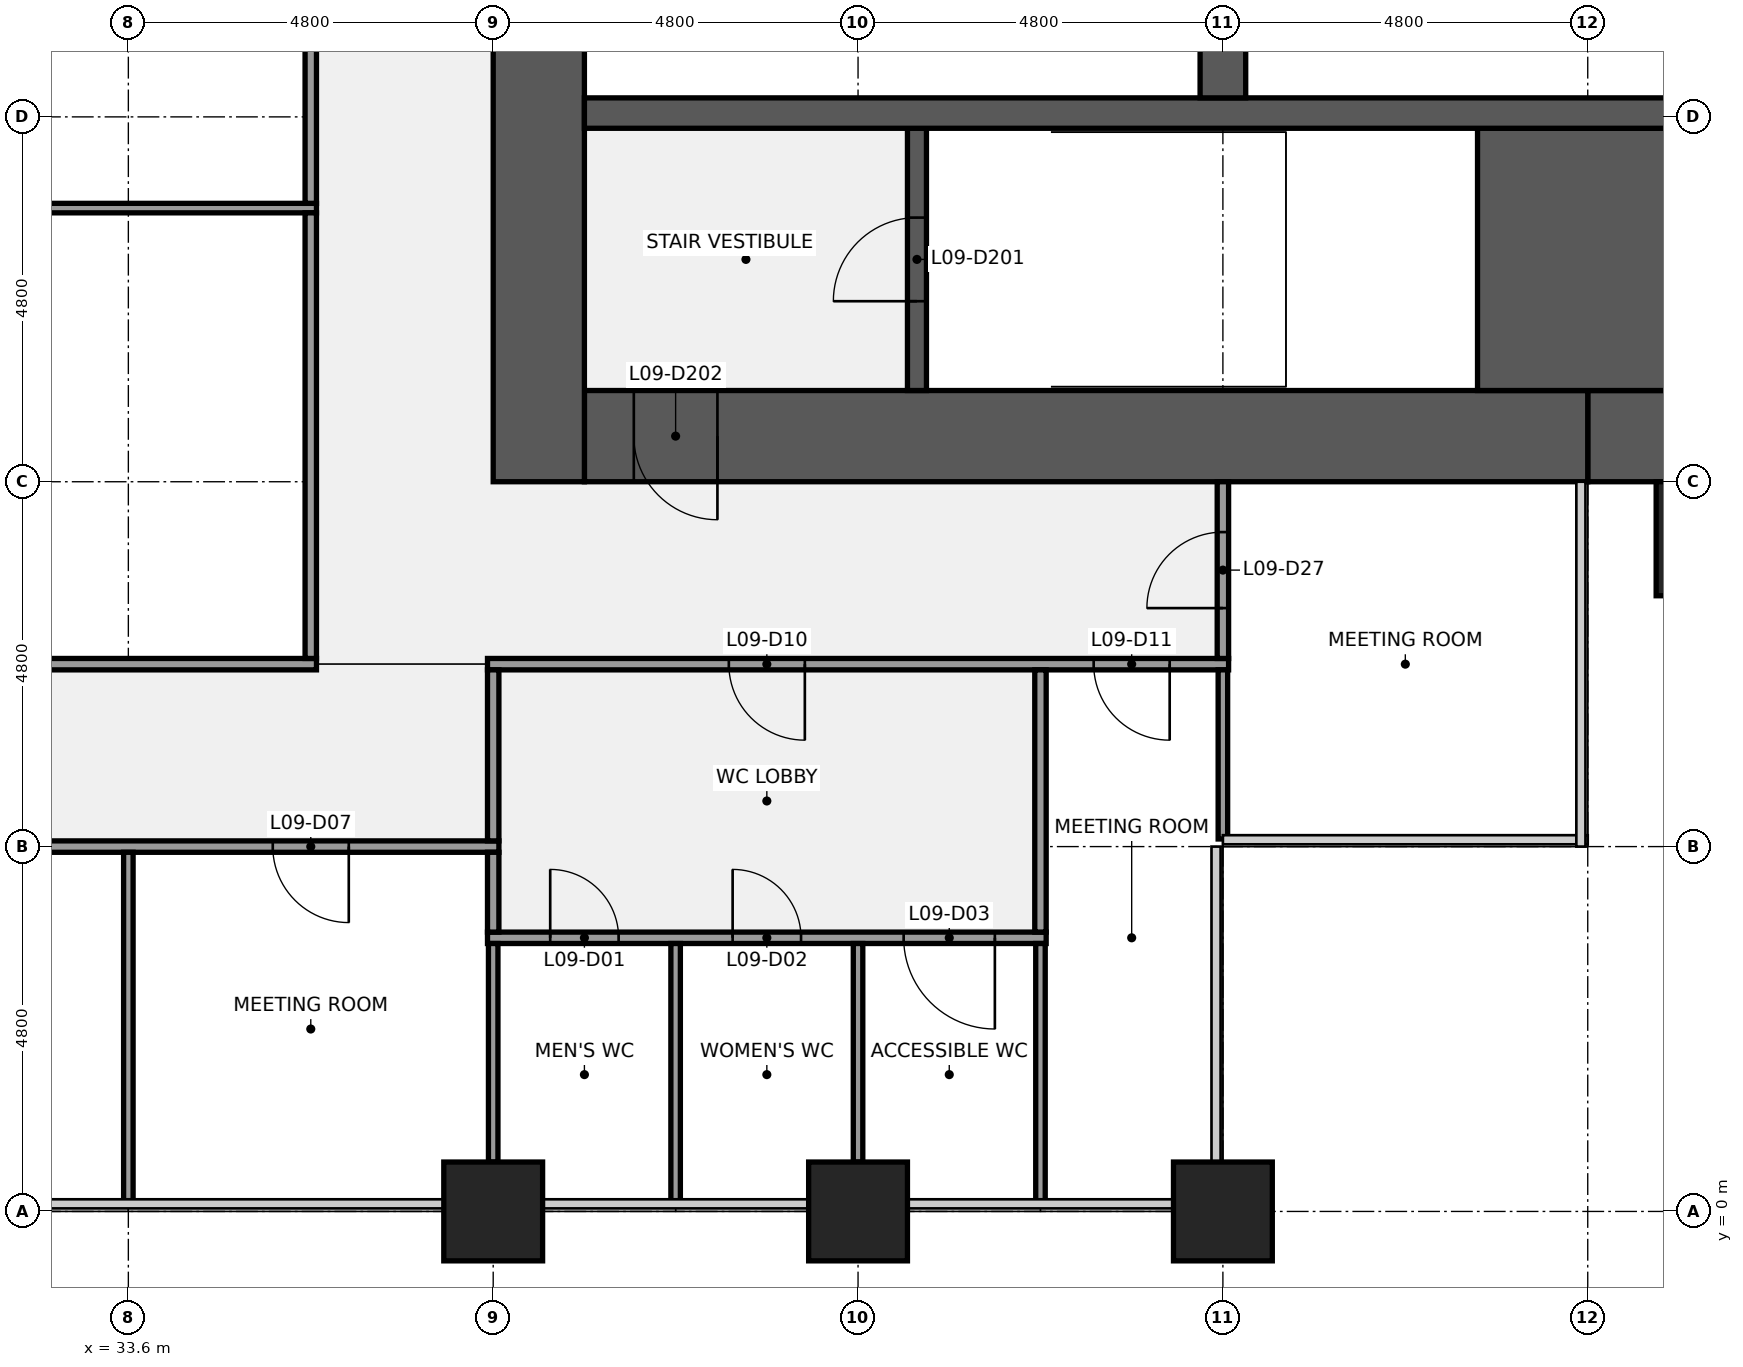
"""IFC4 building model, lengths in metres.
Left out: names, types, materials, properties, quantities, classifications, styles, units other than length and angle.
Written with IfcOpenShell. Run it as: python <this file> out.ifc"""

import sys

from ifc_helpers import new_model, si_unit, direction, frame, frame_2d, origin, origin_2d, place, context, subcontext, project, spatial, rectangle, extrude, element, fill, save


model = new_model("IFC4")
c1 = context("Model", 3, precision=1e-05, world=origin(), true_north=direction((0.0, 1.0)))
c2 = subcontext(c1, "Body", "Model", "MODEL_VIEW")
j1 = project(units=[si_unit("LENGTHUNIT", "METRE"), si_unit("PLANEANGLEUNIT", "RADIAN")], contexts=[c1])
p1 = place(None, origin())
s1 = spatial("IfcSite", under=j1, at=p1, CompositionType="ELEMENT")
p2 = place(p1, origin())
s2 = spatial("IfcBuilding", under=s1, at=p2, CompositionType="ELEMENT")
p3 = place(p2, frame((0.0, 0.0, 47.0)))
s3 = spatial("IfcBuildingStorey", under=s2, at=p3, CompositionType="ELEMENT", Elevation=47.0)
for number, where, z_axis, x_axis in (
    (1, (38.4, 0.0, 0.0), (0.0, 0.0, 1.0), (1.0, 0.0, 0.0)),
    (2, (43.2, 0.0, 0.0), (0.0, 0.0, 1.0), (1.0, 0.0, 0.0)),
    (3, (48.0, 0.0, 0.0), (0.0, 0.0, 1.0), (1.0, 0.0, 0.0)),
):
    element("IfcColumn", number, at=place(p3, frame(where, z_axis=z_axis, x_axis=x_axis)), inside=s3, PredefinedType="COLUMN", context=c2, shape_type="SweptSolid", body=[
        extrude(rectangle(XDim=1.3, YDim=1.3, at=origin_2d()), origin(), (0.0, 0.0, 1.0), 4.0),
    ])
p4 = place(p3, frame((56.4, 10.2, 0.0), z_axis=(0.0, 0.0, 1.0), x_axis=(-1.0, 0.0, 0.0)))
e4 = element("IfcWall", 4, at=p4, inside=s3, PredefinedType="SHEAR", context=c2, shape_type="SweptSolid", body=[
    extrude(rectangle(XDim=3.6, YDim=1.2, at=frame_2d((1.8, 0.0))), origin(), (0.0, 0.0, 1.0), 3.84),
])
p5 = place(p3, frame((52.8, 10.2, 0.0), z_axis=(0.0, 0.0, 1.0), x_axis=(-1.0, 0.0, 0.0)))
e5 = element("IfcWall", 5, at=p5, inside=s3, PredefinedType="SHEAR", context=c2, shape_type="SweptSolid", body=[
    extrude(rectangle(XDim=13.2, YDim=1.2, at=frame_2d((6.6, 0.0))), origin(), (0.0, 0.0, 1.0), 3.84),
])
p6 = place(p5, frame((11.45, 0.0, 0.0)))
e6 = element("IfcOpeningElement", 6, at=p6, cuts=e5, PredefinedType="OPENING", context=c2, shape_type="SweptSolid", body=[
    extrude(rectangle(XDim=1.1, YDim=2.1, at=frame_2d((0.55, 1.05))), frame((0.0, 0.61, 0.0), z_axis=(0.0, -1.0, 0.0), x_axis=(1.0, 0.0, 0.0)), (0.0, 0.0, 1.0), 1.22),
])
p7 = place(p3, frame((39.0, 9.6, 0.0), z_axis=(0.0, 0.0, 1.0), x_axis=(0.0, 1.0, 0.0)))
e7 = element("IfcWall", 7, at=p7, inside=s3, PredefinedType="SHEAR", context=c2, shape_type="SweptSolid", body=[
    extrude(rectangle(XDim=28.8, YDim=1.2, at=frame_2d((14.4, 0.0))), origin(), (0.0, 0.0, 1.0), 3.84),
])
p8 = place(p7, frame((8.7, 0.0, 0.0)))
e8 = element("IfcOpeningElement", 8, at=p8, cuts=e7, PredefinedType="OPENING", context=c2, shape_type="SweptSolid", body=[
    extrude(rectangle(XDim=1.8, YDim=2.1, at=frame_2d((0.9, 1.05))), frame((0.0, 0.61, 0.0), z_axis=(0.0, -1.0, 0.0), x_axis=(1.0, 0.0, 0.0)), (0.0, 0.0, 1.0), 1.22),
])
p9 = place(p7, frame((18.3, 0.0, 0.0)))
e9 = element("IfcOpeningElement", 9, at=p9, cuts=e7, PredefinedType="OPENING", context=c2, shape_type="SweptSolid", body=[
    extrude(rectangle(XDim=1.8, YDim=2.1, at=frame_2d((0.9, 1.05))), frame((0.0, 0.61, 0.0), z_axis=(0.0, -1.0, 0.0), x_axis=(1.0, 0.0, 0.0)), (0.0, 0.0, 1.0), 1.22),
])
p10 = place(p3, frame((51.35, 12.525, 0.0), z_axis=(0.0, 0.0, 1.0), x_axis=(1.0, 0.0, 0.0)))
e10 = element("IfcWall", 10, at=p10, inside=s3, PredefinedType="SHEAR", context=c2, shape_type="SweptSolid", body=[
    extrude(rectangle(XDim=5.05, YDim=3.45, at=frame_2d((2.525, 0.0))), origin(), (0.0, 0.0, 1.0), 3.84),
])
p11 = place(p3, frame((43.975, 10.8, 0.0), z_axis=(0.0, 0.0, 1.0), x_axis=(0.0, 1.0, 0.0)))
e11 = element("IfcWall", 11, at=p11, inside=s3, PredefinedType="SHEAR", context=c2, shape_type="SweptSolid", body=[
    extrude(rectangle(XDim=3.45, YDim=0.25, at=frame_2d((1.725, 0.0))), origin(), (0.0, 0.0, 1.0), 3.84),
])
p12 = place(p11, frame((1.175, 0.0, 0.0)))
e12 = element("IfcOpeningElement", 12, at=p12, cuts=e11, PredefinedType="OPENING", context=c2, shape_type="SweptSolid", body=[
    extrude(rectangle(XDim=1.1, YDim=2.1, at=frame_2d((0.55, 1.05))), frame((0.0, 0.135, 0.0), z_axis=(0.0, -1.0, 0.0), x_axis=(1.0, 0.0, 0.0)), (0.0, 0.0, 1.0), 0.27),
])
p13 = place(p3, frame((39.6, 14.45, 0.0), z_axis=(0.0, 0.0, 1.0), x_axis=(1.0, 0.0, 0.0)))
e13 = element("IfcWall", 13, at=p13, inside=s3, PredefinedType="SHEAR", context=c2, shape_type="SweptSolid", body=[
    extrude(rectangle(XDim=16.8, YDim=0.4, at=frame_2d((8.4, 0.0))), origin(), (0.0, 0.0, 1.0), 3.84),
])
p14 = place(p3, frame((48.0, 14.65, 0.0), z_axis=(0.0, 0.0, 1.0), x_axis=(0.0, 1.0, 0.0)))
e14 = element("IfcWall", 14, at=p14, inside=s3, PredefinedType="SHEAR", context=c2, shape_type="SweptSolid", body=[
    extrude(rectangle(XDim=2.6, YDim=0.6, at=frame_2d((1.3, 0.0))), origin(), (0.0, 0.0, 1.0), 3.84),
])
p15 = place(p3, frame((38.325, 3.6, 0.0), z_axis=(0.0, 0.0, 1.0), x_axis=(1.0, 0.0, 0.0)))
e15 = element("IfcWall", 15, at=p15, inside=s3, PredefinedType="PARTITIONING", context=c2, shape_type="SweptSolid", body=[
    extrude(rectangle(XDim=7.35, YDim=0.15, at=frame_2d((3.675, 0.0))), origin(), (0.0, 0.0, 1.0), 2.87),
])
p16 = place(p15, frame((0.825, 0.0, 0.0)))
e16 = element("IfcOpeningElement", 16, at=p16, cuts=e15, PredefinedType="OPENING", context=c2, shape_type="SweptSolid", body=[
    extrude(rectangle(XDim=0.9, YDim=2.1, at=frame_2d((0.45, 1.05))), frame((0.0, 0.085, 0.0), z_axis=(0.0, -1.0, 0.0), x_axis=(1.0, 0.0, 0.0)), (0.0, 0.0, 1.0), 0.17),
])
p17 = place(p15, frame((3.225, 0.0, 0.0)))
e17 = element("IfcOpeningElement", 17, at=p17, cuts=e15, PredefinedType="OPENING", context=c2, shape_type="SweptSolid", body=[
    extrude(rectangle(XDim=0.9, YDim=2.1, at=frame_2d((0.45, 1.05))), frame((0.0, 0.085, 0.0), z_axis=(0.0, -1.0, 0.0), x_axis=(1.0, 0.0, 0.0)), (0.0, 0.0, 1.0), 0.17),
])
p18 = place(p15, frame((5.475, 0.0, 0.0)))
e18 = element("IfcOpeningElement", 18, at=p18, cuts=e15, PredefinedType="OPENING", context=c2, shape_type="SweptSolid", body=[
    extrude(rectangle(XDim=1.2, YDim=2.1, at=frame_2d((0.6, 1.05))), frame((0.0, 0.085, 0.0), z_axis=(0.0, -1.0, 0.0), x_axis=(1.0, 0.0, 0.0)), (0.0, 0.0, 1.0), 0.17),
])
p19 = place(p3, frame((19.125, 4.8, 0.0), z_axis=(0.0, 0.0, 1.0), x_axis=(1.0, 0.0, 0.0)))
e19 = element("IfcWall", 19, at=p19, inside=s3, PredefinedType="PARTITIONING", context=c2, shape_type="SweptSolid", body=[
    extrude(rectangle(XDim=19.35, YDim=0.15, at=frame_2d((9.675, 0.0))), origin(), (0.0, 0.0, 1.0), 2.87),
])
p20 = place(p19, frame((0.775, 0.0, 0.0)))
e20 = element("IfcOpeningElement", 20, at=p20, cuts=e19, PredefinedType="OPENING", context=c2, shape_type="SweptSolid", body=[
    extrude(rectangle(XDim=1.0, YDim=2.1, at=frame_2d((0.5, 1.05))), frame((0.0, 0.085, 0.0), z_axis=(0.0, -1.0, 0.0), x_axis=(1.0, 0.0, 0.0)), (0.0, 0.0, 1.0), 0.17),
])
p21 = place(p19, frame((4.375, 0.0, 0.0)))
e21 = element("IfcOpeningElement", 21, at=p21, cuts=e19, PredefinedType="OPENING", context=c2, shape_type="SweptSolid", body=[
    extrude(rectangle(XDim=1.0, YDim=2.1, at=frame_2d((0.5, 1.05))), frame((0.0, 0.085, 0.0), z_axis=(0.0, -1.0, 0.0), x_axis=(1.0, 0.0, 0.0)), (0.0, 0.0, 1.0), 0.17),
])
p22 = place(p19, frame((10.375, 0.0, 0.0)))
e22 = element("IfcOpeningElement", 22, at=p22, cuts=e19, PredefinedType="OPENING", context=c2, shape_type="SweptSolid", body=[
    extrude(rectangle(XDim=1.0, YDim=2.1, at=frame_2d((0.5, 1.05))), frame((0.0, 0.085, 0.0), z_axis=(0.0, -1.0, 0.0), x_axis=(1.0, 0.0, 0.0)), (0.0, 0.0, 1.0), 0.17),
])
p23 = place(p19, frame((16.375, 0.0, 0.0)))
e23 = element("IfcOpeningElement", 23, at=p23, cuts=e19, PredefinedType="OPENING", context=c2, shape_type="SweptSolid", body=[
    extrude(rectangle(XDim=1.0, YDim=2.1, at=frame_2d((0.5, 1.05))), frame((0.0, 0.085, 0.0), z_axis=(0.0, -1.0, 0.0), x_axis=(1.0, 0.0, 0.0)), (0.0, 0.0, 1.0), 0.17),
])
p24 = place(p3, frame((21.525, 7.2, 0.0), z_axis=(0.0, 0.0, 1.0), x_axis=(1.0, 0.0, 0.0)))
e24 = element("IfcWall", 24, at=p24, inside=s3, PredefinedType="PARTITIONING", context=c2, shape_type="SweptSolid", body=[
    extrude(rectangle(XDim=14.55, YDim=0.15, at=frame_2d((7.275, 0.0))), origin(), (0.0, 0.0, 1.0), 2.87),
])
p25 = place(p24, frame((6.775, 0.0, 0.0)))
e25 = element("IfcOpeningElement", 25, at=p25, cuts=e24, PredefinedType="OPENING", context=c2, shape_type="SweptSolid", body=[
    extrude(rectangle(XDim=1.0, YDim=2.1, at=frame_2d((0.5, 1.05))), frame((0.0, 0.085, 0.0), z_axis=(0.0, -1.0, 0.0), x_axis=(1.0, 0.0, 0.0)), (0.0, 0.0, 1.0), 0.17),
])
p26 = place(p3, frame((38.325, 7.2, 0.0), z_axis=(0.0, 0.0, 1.0), x_axis=(1.0, 0.0, 0.0)))
e26 = element("IfcWall", 26, at=p26, inside=s3, PredefinedType="PARTITIONING", context=c2, shape_type="SweptSolid", body=[
    extrude(rectangle(XDim=9.75, YDim=0.15, at=frame_2d((4.875, 0.0))), origin(), (0.0, 0.0, 1.0), 2.87),
])
p27 = place(p26, frame((3.175, 0.0, 0.0)))
e27 = element("IfcOpeningElement", 27, at=p27, cuts=e26, PredefinedType="OPENING", context=c2, shape_type="SweptSolid", body=[
    extrude(rectangle(XDim=1.0, YDim=2.1, at=frame_2d((0.5, 1.05))), frame((0.0, 0.085, 0.0), z_axis=(0.0, -1.0, 0.0), x_axis=(1.0, 0.0, 0.0)), (0.0, 0.0, 1.0), 0.17),
])
p28 = place(p26, frame((7.975, 0.0, 0.0)))
e28 = element("IfcOpeningElement", 28, at=p28, cuts=e26, PredefinedType="OPENING", context=c2, shape_type="SweptSolid", body=[
    extrude(rectangle(XDim=1.0, YDim=2.1, at=frame_2d((0.5, 1.05))), frame((0.0, 0.085, 0.0), z_axis=(0.0, -1.0, 0.0), x_axis=(1.0, 0.0, 0.0)), (0.0, 0.0, 1.0), 0.17),
])
p29 = place(p3, frame((21.525, 13.2, 0.0), z_axis=(0.0, 0.0, 1.0), x_axis=(1.0, 0.0, 0.0)))
e29 = element("IfcWall", 29, at=p29, inside=s3, PredefinedType="PARTITIONING", context=c2, shape_type="SweptSolid", body=[
    extrude(rectangle(XDim=14.55, YDim=0.125, at=frame_2d((7.275, 0.0))), origin(), (0.0, 0.0, 1.0), 2.87),
])
p30 = place(p3, frame((33.6, 0.1, 0.0), z_axis=(0.0, 0.0, 1.0), x_axis=(0.0, 1.0, 0.0)))
e30 = element("IfcWall", 30, at=p30, inside=s3, PredefinedType="PARTITIONING", context=c2, shape_type="SweptSolid", body=[
    extrude(rectangle(XDim=4.625, YDim=0.125, at=frame_2d((2.312, 0.0))), origin(), (0.0, 0.0, 1.0), 2.87),
])
p31 = place(p3, frame((36.0, 7.275, 0.0), z_axis=(0.0, 0.0, 1.0), x_axis=(0.0, 1.0, 0.0)))
e31 = element("IfcWall", 31, at=p31, inside=s3, PredefinedType="PARTITIONING", context=c2, shape_type="SweptSolid", body=[
    extrude(rectangle(XDim=5.863, YDim=0.15, at=frame_2d((2.931, 0.0))), origin(), (0.0, 0.0, 1.0), 2.87),
])
p32 = place(p3, frame((36.0, 13.262, 0.0), z_axis=(0.0, 0.0, 1.0), x_axis=(0.0, 1.0, 0.0)))
e32 = element("IfcWall", 32, at=p32, inside=s3, PredefinedType="PARTITIONING", context=c2, shape_type="SweptSolid", body=[
    extrude(rectangle(XDim=7.075, YDim=0.15, at=frame_2d((3.538, 0.0))), origin(), (0.0, 0.0, 1.0), 2.87),
])
p33 = place(p32, frame((3.038, 0.0, 0.0)))
e33 = element("IfcOpeningElement", 33, at=p33, cuts=e32, PredefinedType="OPENING", context=c2, shape_type="SweptSolid", body=[
    extrude(rectangle(XDim=1.0, YDim=2.1, at=frame_2d((0.5, 1.05))), frame((0.0, 0.085, 0.0), z_axis=(0.0, -1.0, 0.0), x_axis=(1.0, 0.0, 0.0)), (0.0, 0.0, 1.0), 0.17),
])
p34 = place(p3, frame((38.4, 0.65, 0.0), z_axis=(0.0, 0.0, 1.0), x_axis=(0.0, 1.0, 0.0)))
e34 = element("IfcWall", 34, at=p34, inside=s3, PredefinedType="PARTITIONING", context=c2, shape_type="SweptSolid", body=[
    extrude(rectangle(XDim=2.875, YDim=0.125, at=frame_2d((1.438, 0.0))), origin(), (0.0, 0.0, 1.0), 2.87),
])
p35 = place(p3, frame((38.4, 3.675, 0.0), z_axis=(0.0, 0.0, 1.0), x_axis=(0.0, 1.0, 0.0)))
e35 = element("IfcWall", 35, at=p35, inside=s3, PredefinedType="PARTITIONING", context=c2, shape_type="SweptSolid", body=[
    extrude(rectangle(XDim=1.05, YDim=0.15, at=frame_2d((0.525, 0.0))), origin(), (0.0, 0.0, 1.0), 2.87),
])
p36 = place(p3, frame((38.4, 4.875, 0.0), z_axis=(0.0, 0.0, 1.0), x_axis=(0.0, 1.0, 0.0)))
e36 = element("IfcWall", 36, at=p36, inside=s3, PredefinedType="PARTITIONING", context=c2, shape_type="SweptSolid", body=[
    extrude(rectangle(XDim=2.25, YDim=0.15, at=frame_2d((1.125, 0.0))), origin(), (0.0, 0.0, 1.0), 2.87),
])
p37 = place(p3, frame((40.8, 0.1, 0.0), z_axis=(0.0, 0.0, 1.0), x_axis=(0.0, 1.0, 0.0)))
e37 = element("IfcWall", 37, at=p37, inside=s3, PredefinedType="PARTITIONING", context=c2, shape_type="SweptSolid", body=[
    extrude(rectangle(XDim=3.425, YDim=0.125, at=frame_2d((1.712, 0.0))), origin(), (0.0, 0.0, 1.0), 2.87),
])
p38 = place(p3, frame((43.2, 0.65, 0.0), z_axis=(0.0, 0.0, 1.0), x_axis=(0.0, 1.0, 0.0)))
e38 = element("IfcWall", 38, at=p38, inside=s3, PredefinedType="PARTITIONING", context=c2, shape_type="SweptSolid", body=[
    extrude(rectangle(XDim=2.875, YDim=0.125, at=frame_2d((1.438, 0.0))), origin(), (0.0, 0.0, 1.0), 2.87),
])
p39 = place(p3, frame((45.6, 0.1, 0.0), z_axis=(0.0, 0.0, 1.0), x_axis=(0.0, 1.0, 0.0)))
e39 = element("IfcWall", 39, at=p39, inside=s3, PredefinedType="PARTITIONING", context=c2, shape_type="SweptSolid", body=[
    extrude(rectangle(XDim=3.425, YDim=0.125, at=frame_2d((1.712, 0.0))), origin(), (0.0, 0.0, 1.0), 2.87),
])
p40 = place(p3, frame((45.6, 3.675, 0.0), z_axis=(0.0, 0.0, 1.0), x_axis=(0.0, 1.0, 0.0)))
e40 = element("IfcWall", 40, at=p40, inside=s3, PredefinedType="PARTITIONING", context=c2, shape_type="SweptSolid", body=[
    extrude(rectangle(XDim=3.45, YDim=0.15, at=frame_2d((1.725, 0.0))), origin(), (0.0, 0.0, 1.0), 2.87),
])
p41 = place(p3, frame((48.0, 4.9, 0.0), z_axis=(0.0, 0.0, 1.0), x_axis=(0.0, 1.0, 0.0)))
e41 = element("IfcWall", 41, at=p41, inside=s3, PredefinedType="PARTITIONING", context=c2, shape_type="SweptSolid", body=[
    extrude(rectangle(XDim=2.225, YDim=0.125, at=frame_2d((1.113, 0.0))), origin(), (0.0, 0.0, 1.0), 2.87),
])
p42 = place(p3, frame((48.0, 7.275, 0.0), z_axis=(0.0, 0.0, 1.0), x_axis=(0.0, 1.0, 0.0)))
e42 = element("IfcWall", 42, at=p42, inside=s3, PredefinedType="PARTITIONING", context=c2, shape_type="SweptSolid", body=[
    extrude(rectangle(XDim=2.325, YDim=0.15, at=frame_2d((1.163, 0.0))), origin(), (0.0, 0.0, 1.0), 2.87),
])
p43 = place(p42, frame((0.663, 0.0, 0.0)))
e43 = element("IfcOpeningElement", 43, at=p43, cuts=e42, PredefinedType="OPENING", context=c2, shape_type="SweptSolid", body=[
    extrude(rectangle(XDim=1.0, YDim=2.1, at=frame_2d((0.5, 1.05))), frame((0.0, 0.085, 0.0), z_axis=(0.0, -1.0, 0.0), x_axis=(1.0, 0.0, 0.0)), (0.0, 0.0, 1.0), 0.17),
])
p44 = place(p3, frame((55.2, 8.85, 0.0), z_axis=(0.0, 0.0, 1.0), x_axis=(1.0, 0.0, 0.0)))
e44 = element("IfcColumn", 44, at=p44, inside=s3, PredefinedType="PILASTER", context=c2, shape_type="SweptSolid", body=[
    extrude(rectangle(XDim=3.0, YDim=1.5, at=origin_2d()), origin(), (0.0, 0.0, 1.0), 4.0),
])
for number, where, z_axis, x_axis in (
    (45, (38.4, -1.075, 0.0), (0.0, 0.0, 1.0), (1.0, 0.0, 0.0)),
    (46, (43.2, -1.075, 0.0), (0.0, 0.0, 1.0), (1.0, 0.0, 0.0)),
    (47, (48.0, -1.075, 0.0), (0.0, 0.0, 1.0), (1.0, 0.0, 0.0)),
):
    element("IfcColumn", number, at=place(p3, frame(where, z_axis=z_axis, x_axis=x_axis)), inside=s3, PredefinedType="PILASTER", context=c2, shape_type="SweptSolid", body=[
        extrude(rectangle(XDim=4.2, YDim=0.85, at=origin_2d()), origin(), (0.0, 0.0, 1.0), 4.0),
    ])
p45 = place(p12, origin())
e48 = element("IfcDoor", 48, at=p45, inside=s3, OperationType="SINGLE_SWING_LEFT", PredefinedType="DOOR", context=c2, shape_type="SweptSolid", body=[
    extrude(rectangle(XDim=1.1, YDim=2.1, at=frame_2d((0.55, 1.05))), frame((0.0, 0.025, 0.0), z_axis=(0.0, -1.0, 0.0), x_axis=(1.0, 0.0, 0.0)), (0.0, 0.0, 1.0), 0.05),
])
fill(e12, e48)
p46 = place(p6, origin())
e49 = element("IfcDoor", 49, at=p46, inside=s3, OperationType="SINGLE_SWING_LEFT", PredefinedType="DOOR", context=c2, shape_type="SweptSolid", body=[
    extrude(rectangle(XDim=1.1, YDim=2.1, at=frame_2d((0.55, 1.05))), frame((0.0, 0.025, 0.0), z_axis=(0.0, -1.0, 0.0), x_axis=(1.0, 0.0, 0.0)), (0.0, 0.0, 1.0), 0.05),
])
fill(e6, e49)
p47 = place(p16, origin())
e50 = element("IfcDoor", 50, at=p47, inside=s3, OperationType="SINGLE_SWING_LEFT", PredefinedType="DOOR", context=c2, shape_type="SweptSolid", body=[
    extrude(rectangle(XDim=0.9, YDim=2.1, at=frame_2d((0.45, 1.05))), frame((0.0, 0.025, 0.0), z_axis=(0.0, -1.0, 0.0), x_axis=(1.0, 0.0, 0.0)), (0.0, 0.0, 1.0), 0.05),
])
fill(e16, e50)
p48 = place(p17, origin())
e51 = element("IfcDoor", 51, at=p48, inside=s3, OperationType="SINGLE_SWING_LEFT", PredefinedType="DOOR", context=c2, shape_type="SweptSolid", body=[
    extrude(rectangle(XDim=0.9, YDim=2.1, at=frame_2d((0.45, 1.05))), frame((0.0, 0.025, 0.0), z_axis=(0.0, -1.0, 0.0), x_axis=(1.0, 0.0, 0.0)), (0.0, 0.0, 1.0), 0.05),
])
fill(e17, e51)
p49 = place(p18, origin())
e52 = element("IfcDoor", 52, at=p49, inside=s3, OperationType="SINGLE_SWING_RIGHT", PredefinedType="DOOR", context=c2, shape_type="SweptSolid", body=[
    extrude(rectangle(XDim=1.2, YDim=2.1, at=frame_2d((0.6, 1.05))), frame((0.0, 0.025, 0.0), z_axis=(0.0, -1.0, 0.0), x_axis=(1.0, 0.0, 0.0)), (0.0, 0.0, 1.0), 0.05),
])
fill(e18, e52)
p50 = place(p23, origin())
e53 = element("IfcDoor", 53, at=p50, inside=s3, OperationType="SINGLE_SWING_RIGHT", PredefinedType="DOOR", context=c2, shape_type="SweptSolid", body=[
    extrude(rectangle(XDim=1.0, YDim=2.1, at=frame_2d((0.5, 1.05))), frame((0.0, 0.025, 0.0), z_axis=(0.0, -1.0, 0.0), x_axis=(1.0, 0.0, 0.0)), (0.0, 0.0, 1.0), 0.05),
])
fill(e23, e53)
p51 = place(p27, origin())
e54 = element("IfcDoor", 54, at=p51, inside=s3, OperationType="SINGLE_SWING_RIGHT", PredefinedType="DOOR", context=c2, shape_type="SweptSolid", body=[
    extrude(rectangle(XDim=1.0, YDim=2.1, at=frame_2d((0.5, 1.05))), frame((0.0, 0.025, 0.0), z_axis=(0.0, -1.0, 0.0), x_axis=(1.0, 0.0, 0.0)), (0.0, 0.0, 1.0), 0.05),
])
fill(e27, e54)
p52 = place(p28, origin())
e55 = element("IfcDoor", 55, at=p52, inside=s3, OperationType="SINGLE_SWING_RIGHT", PredefinedType="DOOR", context=c2, shape_type="SweptSolid", body=[
    extrude(rectangle(XDim=1.0, YDim=2.1, at=frame_2d((0.5, 1.05))), frame((0.0, 0.025, 0.0), z_axis=(0.0, -1.0, 0.0), x_axis=(1.0, 0.0, 0.0)), (0.0, 0.0, 1.0), 0.05),
])
fill(e28, e55)
p53 = place(p43, origin())
e56 = element("IfcDoor", 56, at=p53, inside=s3, OperationType="SINGLE_SWING_LEFT", PredefinedType="DOOR", context=c2, shape_type="SweptSolid", body=[
    extrude(rectangle(XDim=1.0, YDim=2.1, at=frame_2d((0.5, 1.05))), frame((0.0, 0.025, 0.0), z_axis=(0.0, -1.0, 0.0), x_axis=(1.0, 0.0, 0.0)), (0.0, 0.0, 1.0), 0.05),
])
fill(e43, e56)
save(model, sys.argv[1])
